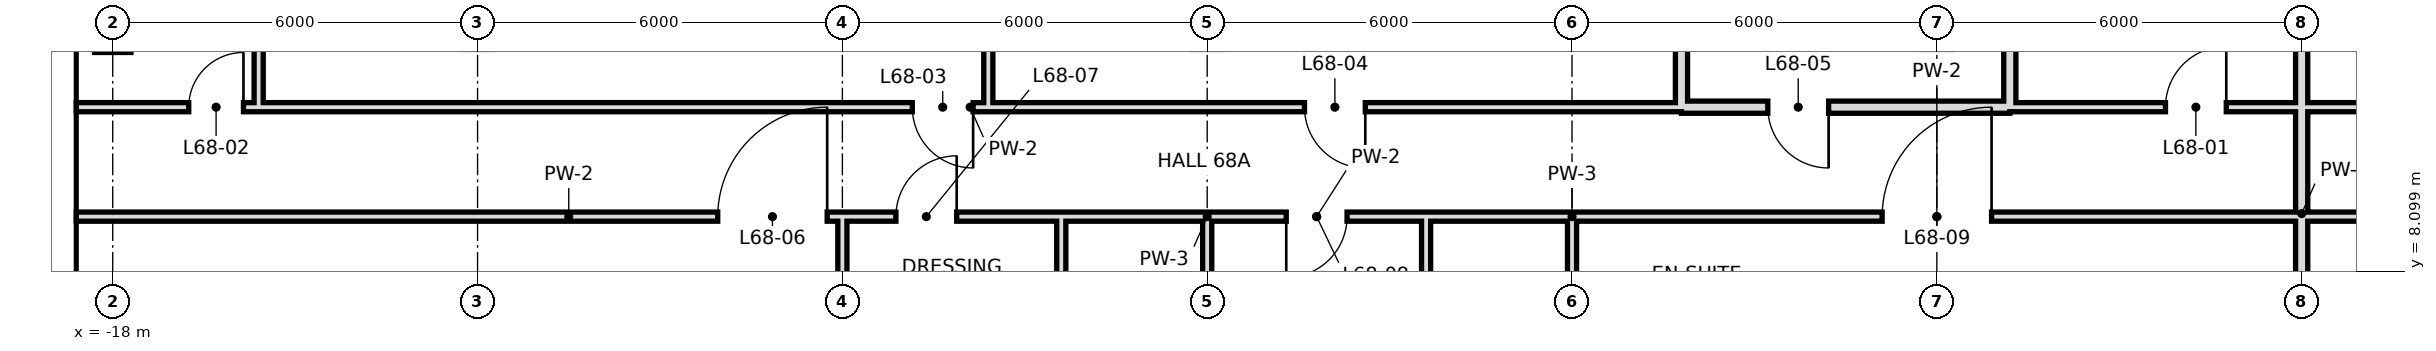
"""IFC4 building model, lengths in metres.
Left out: names, types, materials, properties, quantities, classifications, styles, units other than length and angle.
Written with IfcOpenShell. Run it as: python <this file> out.ifc"""

import sys

from ifc_helpers import new_model, si_unit, direction, frame, frame_2d, origin, place, context, subcontext, project, spatial, rectangle, extrude, element, fill, save


model = new_model("IFC4")
c1 = context("Model", 3, precision=1e-05, world=origin(), true_north=direction((0.0, 1.0)))
c2 = subcontext(c1, "Body", "Model", "MODEL_VIEW")
j1 = project(units=[si_unit("LENGTHUNIT", "METRE"), si_unit("PLANEANGLEUNIT", "RADIAN")], contexts=[c1])
p1 = place(None, origin())
s1 = spatial("IfcSite", under=j1, at=p1, CompositionType="ELEMENT")
p2 = place(p1, origin())
s2 = spatial("IfcBuilding", under=s1, at=p2, CompositionType="ELEMENT")
p3 = place(p2, frame((0.0, 0.0, 290.8)))
s3 = spatial("IfcBuildingStorey", under=s2, at=p3, CompositionType="ELEMENT", Elevation=290.8)
p4 = place(p3, frame((-15.6, 10.8, 0.0), z_axis=(0.0, 0.0, 1.0), x_axis=(0.0, 1.0, 0.0)))
e1 = element("IfcWall", 1, at=p4, inside=s3, PredefinedType="PARTITIONING", context=c2, shape_type="SweptSolid", body=[
    extrude(rectangle(XDim=7.2, YDim=0.15, at=frame_2d((3.6, 0.0))), origin(), (0.0, 0.0, 1.0), 3.42),
])
p5 = place(p3, frame((-2.4, 6.0, 0.0), z_axis=(0.0, 0.0, 1.0), x_axis=(0.0, 1.0, 0.0)))
e2 = element("IfcWall", 2, at=p5, inside=s3, PredefinedType="PARTITIONING", context=c2, shape_type="SweptSolid", body=[
    extrude(rectangle(XDim=3.0, YDim=0.15, at=frame_2d((1.5, 0.0))), origin(), (0.0, 0.0, 1.0), 3.42),
])
p6 = place(p3, frame((-3.6, 10.8, 0.0), z_axis=(0.0, 0.0, 1.0), x_axis=(0.0, 1.0, 0.0)))
e3 = element("IfcWall", 3, at=p6, inside=s3, PredefinedType="PARTITIONING", context=c2, shape_type="SweptSolid", body=[
    extrude(rectangle(XDim=7.2, YDim=0.15, at=frame_2d((3.6, 0.0))), origin(), (0.0, 0.0, 1.0), 3.42),
])
p7 = place(p3, frame((-6.0, -0.6, 0.0), z_axis=(0.0, 0.0, 1.0), x_axis=(0.0, 1.0, 0.0)))
e4 = element("IfcWall", 4, at=p7, inside=s3, PredefinedType="PARTITIONING", context=c2, shape_type="SweptSolid", body=[
    extrude(rectangle(XDim=9.6, YDim=0.15, at=frame_2d((4.8, 0.0))), origin(), (0.0, 0.0, 1.0), 3.42),
])
p8 = place(p3, frame((0.0, 6.0, 0.0), z_axis=(0.0, 0.0, 1.0), x_axis=(0.0, 1.0, 0.0)))
e5 = element("IfcWall", 5, at=p8, inside=s3, PredefinedType="PARTITIONING", context=c2, shape_type="SweptSolid", body=[
    extrude(rectangle(XDim=3.0, YDim=0.15, at=frame_2d((1.5, 0.0))), origin(), (0.0, 0.0, 1.0), 2.72),
])
p9 = place(p3, frame((13.2, 10.8, 0.0), z_axis=(0.0, 0.0, 1.0), x_axis=(0.0, 1.0, 0.0)))
e6 = element("IfcWall", 6, at=p9, inside=s3, PredefinedType="SOLIDWALL", context=c2, shape_type="SweptSolid", body=[
    extrude(rectangle(XDim=7.9, YDim=0.2, at=frame_2d((3.95, 0.0))), origin(), (0.0, 0.0, 1.0), 2.72),
])
p10 = place(p3, frame((18.0, -0.6, 0.0), z_axis=(0.0, 0.0, 1.0), x_axis=(0.0, 1.0, 0.0)))
e7 = element("IfcWall", 7, at=p10, inside=s3, PredefinedType="SOLIDWALL", context=c2, shape_type="SweptSolid", body=[
    extrude(rectangle(XDim=19.3, YDim=0.2, at=frame_2d((9.65, 0.0))), origin(), (0.0, 0.0, 1.0), 2.72),
])
p11 = place(p3, frame((3.6, 6.0, 0.0), z_axis=(0.0, 0.0, 1.0), x_axis=(0.0, 1.0, 0.0)))
e8 = element("IfcWall", 8, at=p11, inside=s3, PredefinedType="PARTITIONING", context=c2, shape_type="SweptSolid", body=[
    extrude(rectangle(XDim=3.0, YDim=0.15, at=frame_2d((1.5, 0.0))), origin(), (0.0, 0.0, 1.0), 3.42),
])
p12 = place(p3, frame((6.0, 6.0, 0.0), z_axis=(0.0, 0.0, 1.0), x_axis=(0.0, 1.0, 0.0)))
e9 = element("IfcWall", 9, at=p12, inside=s3, PredefinedType="PARTITIONING", context=c2, shape_type="SweptSolid", body=[
    extrude(rectangle(XDim=3.0, YDim=0.15, at=frame_2d((1.5, 0.0))), origin(), (0.0, 0.0, 1.0), 2.72),
])
p13 = place(p3, frame((7.8, 10.8, 0.0), z_axis=(0.0, 0.0, 1.0), x_axis=(0.0, 1.0, 0.0)))
e10 = element("IfcWall", 10, at=p13, inside=s3, PredefinedType="SOLIDWALL", context=c2, shape_type="SweptSolid", body=[
    extrude(rectangle(XDim=7.9, YDim=0.2, at=frame_2d((3.95, 0.0))), origin(), (0.0, 0.0, 1.0), 2.72),
])
p14 = place(p3, frame((7.8, 10.8, 0.0), z_axis=(0.0, 0.0, 1.0), x_axis=(1.0, 0.0, 0.0)))
e11 = element("IfcWall", 11, at=p14, inside=s3, PredefinedType="SOLIDWALL", context=c2, shape_type="SweptSolid", body=[
    extrude(rectangle(XDim=5.4, YDim=0.2, at=frame_2d((2.7, 0.0))), origin(), (0.0, 0.0, 1.0), 2.72),
])
p15 = place(p14, frame((1.42, 0.0, 0.0)))
e12 = element("IfcOpeningElement", 12, at=p15, cuts=e11, PredefinedType="OPENING", context=c2, shape_type="SweptSolid", body=[
    extrude(rectangle(XDim=1.0, YDim=2.4, at=frame_2d((0.5, 1.2))), frame((0.0, 0.11, 0.0), z_axis=(0.0, -1.0, 0.0), x_axis=(1.0, 0.0, 0.0)), (0.0, 0.0, 1.0), 0.22),
])
p16 = place(p3, frame((-15.6, 10.8, 0.0), z_axis=(0.0, 0.0, 1.0), x_axis=(1.0, 0.0, 0.0)))
e13 = element("IfcWall", 13, at=p16, inside=s3, PredefinedType="PARTITIONING", context=c2, shape_type="SweptSolid", body=[
    extrude(rectangle(XDim=23.4, YDim=0.15, at=frame_2d((11.7, 0.0))), origin(), (0.0, 0.0, 1.0), 3.42),
])
p17 = place(p16, frame((10.75, 0.0, 0.0)))
e14 = element("IfcOpeningElement", 14, at=p17, cuts=e13, PredefinedType="OPENING", context=c2, shape_type="SweptSolid", body=[
    extrude(rectangle(XDim=1.0, YDim=2.4, at=frame_2d((0.5, 1.2))), frame((0.0, 0.085, 0.0), z_axis=(0.0, -1.0, 0.0), x_axis=(1.0, 0.0, 0.0)), (0.0, 0.0, 1.0), 0.17),
])
p18 = place(p16, frame((17.2, 0.0, 0.0)))
e15 = element("IfcOpeningElement", 15, at=p18, cuts=e13, PredefinedType="OPENING", context=c2, shape_type="SweptSolid", body=[
    extrude(rectangle(XDim=1.0, YDim=2.4, at=frame_2d((0.5, 1.2))), frame((0.0, 0.085, 0.0), z_axis=(0.0, -1.0, 0.0), x_axis=(1.0, 0.0, 0.0)), (0.0, 0.0, 1.0), 0.17),
])
p19 = place(p3, frame((13.2, 10.8, 0.0), z_axis=(0.0, 0.0, 1.0), x_axis=(1.0, 0.0, 0.0)))
e16 = element("IfcWall", 16, at=p19, inside=s3, PredefinedType="PARTITIONING", context=c2, shape_type="SweptSolid", body=[
    extrude(rectangle(XDim=27.6, YDim=0.15, at=frame_2d((13.8, 0.0))), origin(), (0.0, 0.0, 1.0), 3.42),
])
p20 = place(p19, frame((2.56, 0.0, 0.0)))
e17 = element("IfcOpeningElement", 17, at=p20, cuts=e16, PredefinedType="OPENING", context=c2, shape_type="SweptSolid", body=[
    extrude(rectangle(XDim=1.0, YDim=2.4, at=frame_2d((0.5, 1.2))), frame((0.0, 0.085, 0.0), z_axis=(0.0, -1.0, 0.0), x_axis=(1.0, 0.0, 0.0)), (0.0, 0.0, 1.0), 0.17),
])
p21 = place(p19, frame((16.12, 0.0, 0.0)))
e18 = element("IfcOpeningElement", 18, at=p21, cuts=e16, PredefinedType="OPENING", context=c2, shape_type="SweptSolid", body=[
    extrude(rectangle(XDim=1.0, YDim=2.4, at=frame_2d((0.5, 1.2))), frame((0.0, 0.085, 0.0), z_axis=(0.0, -1.0, 0.0), x_axis=(1.0, 0.0, 0.0)), (0.0, 0.0, 1.0), 0.17),
])
p22 = place(p19, frame((9.1, 0.0, 0.0)))
e19 = element("IfcOpeningElement", 19, at=p22, cuts=e16, PredefinedType="OPENING", context=c2, shape_type="SweptSolid", body=[
    extrude(rectangle(XDim=1.0, YDim=2.4, at=frame_2d((0.5, 1.2))), frame((0.0, 0.085, 0.0), z_axis=(0.0, -1.0, 0.0), x_axis=(1.0, 0.0, 0.0)), (0.0, 0.0, 1.0), 0.17),
])
p23 = place(p19, frame((20.68, 0.0, 0.0)))
e20 = element("IfcOpeningElement", 20, at=p23, cuts=e16, PredefinedType="OPENING", context=c2, shape_type="SweptSolid", body=[
    extrude(rectangle(XDim=1.0, YDim=2.4, at=frame_2d((0.5, 1.2))), frame((0.0, 0.085, 0.0), z_axis=(0.0, -1.0, 0.0), x_axis=(1.0, 0.0, 0.0)), (0.0, 0.0, 1.0), 0.17),
])
p24 = place(p3, frame((-18.6, 10.8, 0.0), z_axis=(0.0, 0.0, 1.0), x_axis=(1.0, 0.0, 0.0)))
e21 = element("IfcWall", 21, at=p24, inside=s3, PredefinedType="PARTITIONING", context=c2, shape_type="SweptSolid", body=[
    extrude(rectangle(XDim=3.0, YDim=0.15, at=frame_2d((1.5, 0.0))), origin(), (0.0, 0.0, 1.0), 3.42),
])
p25 = place(p24, frame((1.85, 0.0, 0.0)))
e22 = element("IfcOpeningElement", 22, at=p25, cuts=e21, PredefinedType="OPENING", context=c2, shape_type="SweptSolid", body=[
    extrude(rectangle(XDim=0.9, YDim=2.4, at=frame_2d((0.45, 1.2))), frame((0.0, 0.085, 0.0), z_axis=(0.0, -1.0, 0.0), x_axis=(1.0, 0.0, 0.0)), (0.0, 0.0, 1.0), 0.17),
])
p26 = place(p3, frame((-18.6, 9.0, 0.0), z_axis=(0.0, 0.0, 1.0), x_axis=(1.0, 0.0, 0.0)))
e23 = element("IfcWall", 23, at=p26, inside=s3, PredefinedType="PARTITIONING", context=c2, shape_type="SweptSolid", body=[
    extrude(rectangle(XDim=16.2, YDim=0.15, at=frame_2d((8.1, 0.0))), origin(), (0.0, 0.0, 1.0), 3.42),
])
p27 = place(p26, frame((10.55, 0.0, 0.0)))
e24 = element("IfcOpeningElement", 24, at=p27, cuts=e23, PredefinedType="OPENING", context=c2, shape_type="SweptSolid", body=[
    extrude(rectangle(XDim=1.8, YDim=2.4, at=frame_2d((0.9, 1.2))), frame((0.0, 0.085, 0.0), z_axis=(0.0, -1.0, 0.0), x_axis=(1.0, 0.0, 0.0)), (0.0, 0.0, 1.0), 0.17),
])
p28 = place(p26, frame((13.48, 0.0, 0.0)))
e25 = element("IfcOpeningElement", 25, at=p28, cuts=e23, PredefinedType="OPENING", context=c2, shape_type="SweptSolid", body=[
    extrude(rectangle(XDim=1.0, YDim=2.4, at=frame_2d((0.5, 1.2))), frame((0.0, 0.085, 0.0), z_axis=(0.0, -1.0, 0.0), x_axis=(1.0, 0.0, 0.0)), (0.0, 0.0, 1.0), 0.17),
])
p29 = place(p3, frame((0.0, 9.0, 0.0), z_axis=(0.0, 0.0, 1.0), x_axis=(1.0, 0.0, 0.0)))
e26 = element("IfcWall", 26, at=p29, inside=s3, PredefinedType="PARTITIONING", context=c2, shape_type="SweptSolid", body=[
    extrude(rectangle(XDim=3.6, YDim=0.15, at=frame_2d((1.8, 0.0))), origin(), (0.0, 0.0, 1.0), 3.42),
])
p30 = place(p29, frame((1.3, 0.0, 0.0)))
e27 = element("IfcOpeningElement", 27, at=p30, cuts=e26, PredefinedType="OPENING", context=c2, shape_type="SweptSolid", body=[
    extrude(rectangle(XDim=1.0, YDim=2.4, at=frame_2d((0.5, 1.2))), frame((0.0, 0.085, 0.0), z_axis=(0.0, -1.0, 0.0), x_axis=(1.0, 0.0, 0.0)), (0.0, 0.0, 1.0), 0.17),
])
p31 = place(p3, frame((6.0, 9.0, 0.0), z_axis=(0.0, 0.0, 1.0), x_axis=(1.0, 0.0, 0.0)))
e28 = element("IfcWall", 28, at=p31, inside=s3, PredefinedType="PARTITIONING", context=c2, shape_type="SweptSolid", body=[
    extrude(rectangle(XDim=12.0, YDim=0.15, at=frame_2d((6.0, 0.0))), origin(), (0.0, 0.0, 1.0), 3.42),
])
p32 = place(p31, frame((5.1, 0.0, 0.0)))
e29 = element("IfcOpeningElement", 29, at=p32, cuts=e28, PredefinedType="OPENING", context=c2, shape_type="SweptSolid", body=[
    extrude(rectangle(XDim=1.8, YDim=2.4, at=frame_2d((0.9, 1.2))), frame((0.0, 0.085, 0.0), z_axis=(0.0, -1.0, 0.0), x_axis=(1.0, 0.0, 0.0)), (0.0, 0.0, 1.0), 0.17),
])
for number, where, z_axis, x_axis in (
    (30, (-2.4, 9.0, 0.0), (0.0, 0.0, 1.0), (1.0, 0.0, 0.0)),
    (31, (3.6, 9.0, 0.0), (0.0, 0.0, 1.0), (1.0, 0.0, 0.0)),
    (32, (18.0, 9.0, 0.0), (0.0, 0.0, 1.0), (1.0, 0.0, 0.0)),
):
    element("IfcWall", number, at=place(p3, frame(where, z_axis=z_axis, x_axis=x_axis)), inside=s3, PredefinedType="PARTITIONING", context=c2, shape_type="SweptSolid", body=[
        extrude(rectangle(XDim=2.4, YDim=0.15, at=frame_2d((1.2, 0.0))), origin(), (0.0, 0.0, 1.0), 3.42),
    ])
p33 = place(p20, frame((1.0, 0.0, 0.0), z_axis=(0.0, 0.0, 1.0), x_axis=(-1.0, 0.0, 0.0)))
e33 = element("IfcDoor", 33, at=p33, inside=s3, OperationType="SINGLE_SWING_LEFT", PredefinedType="DOOR", context=c2, shape_type="SweptSolid", body=[
    extrude(rectangle(XDim=1.0, YDim=2.4, at=frame_2d((0.5, 1.2))), frame((0.0, 0.025, 0.0), z_axis=(0.0, -1.0, 0.0), x_axis=(1.0, 0.0, 0.0)), (0.0, 0.0, 1.0), 0.05),
])
fill(e17, e33)
p34 = place(p25, frame((0.9, 0.0, 0.0), z_axis=(0.0, 0.0, 1.0), x_axis=(-1.0, 0.0, 0.0)))
e34 = element("IfcDoor", 34, at=p34, inside=s3, OperationType="SINGLE_SWING_LEFT", PredefinedType="DOOR", context=c2, shape_type="SweptSolid", body=[
    extrude(rectangle(XDim=0.9, YDim=2.4, at=frame_2d((0.45, 1.2))), frame((0.0, 0.025, 0.0), z_axis=(0.0, -1.0, 0.0), x_axis=(1.0, 0.0, 0.0)), (0.0, 0.0, 1.0), 0.05),
])
fill(e22, e34)
p35 = place(p17, origin())
e35 = element("IfcDoor", 35, at=p35, inside=s3, OperationType="SINGLE_SWING_RIGHT", PredefinedType="DOOR", context=c2, shape_type="SweptSolid", body=[
    extrude(rectangle(XDim=1.0, YDim=2.4, at=frame_2d((0.5, 1.2))), frame((0.0, 0.025, 0.0), z_axis=(0.0, -1.0, 0.0), x_axis=(1.0, 0.0, 0.0)), (0.0, 0.0, 1.0), 0.05),
])
fill(e14, e35)
p36 = place(p18, origin())
e36 = element("IfcDoor", 36, at=p36, inside=s3, OperationType="SINGLE_SWING_RIGHT", PredefinedType="DOOR", context=c2, shape_type="SweptSolid", body=[
    extrude(rectangle(XDim=1.0, YDim=2.4, at=frame_2d((0.5, 1.2))), frame((0.0, 0.025, 0.0), z_axis=(0.0, -1.0, 0.0), x_axis=(1.0, 0.0, 0.0)), (0.0, 0.0, 1.0), 0.05),
])
fill(e15, e36)
p37 = place(p15, origin())
e37 = element("IfcDoor", 37, at=p37, inside=s3, OperationType="SINGLE_SWING_RIGHT", PredefinedType="DOOR", context=c2, shape_type="SweptSolid", body=[
    extrude(rectangle(XDim=1.0, YDim=2.4, at=frame_2d((0.5, 1.2))), frame((0.0, 0.025, 0.0), z_axis=(0.0, -1.0, 0.0), x_axis=(1.0, 0.0, 0.0)), (0.0, 0.0, 1.0), 0.05),
])
fill(e12, e37)
p38 = place(p27, frame((1.8, 0.0, 0.0), z_axis=(0.0, 0.0, 1.0), x_axis=(-1.0, 0.0, 0.0)))
e38 = element("IfcDoor", 38, at=p38, inside=s3, OperationType="SINGLE_SWING_LEFT", PredefinedType="DOOR", context=c2, shape_type="SweptSolid", body=[
    extrude(rectangle(XDim=1.8, YDim=2.4, at=frame_2d((0.9, 1.2))), frame((0.0, 0.025, 0.0), z_axis=(0.0, -1.0, 0.0), x_axis=(1.0, 0.0, 0.0)), (0.0, 0.0, 1.0), 0.05),
])
fill(e24, e38)
p39 = place(p28, frame((1.0, 0.0, 0.0), z_axis=(0.0, 0.0, 1.0), x_axis=(-1.0, 0.0, 0.0)))
e39 = element("IfcDoor", 39, at=p39, inside=s3, OperationType="SINGLE_SWING_LEFT", PredefinedType="DOOR", context=c2, shape_type="SweptSolid", body=[
    extrude(rectangle(XDim=1.0, YDim=2.4, at=frame_2d((0.5, 1.2))), frame((0.0, 0.025, 0.0), z_axis=(0.0, -1.0, 0.0), x_axis=(1.0, 0.0, 0.0)), (0.0, 0.0, 1.0), 0.05),
])
fill(e25, e39)
p40 = place(p30, frame((1.0, 0.0, 0.0), z_axis=(0.0, 0.0, 1.0), x_axis=(-1.0, 0.0, 0.0)))
e40 = element("IfcDoor", 40, at=p40, inside=s3, OperationType="SINGLE_SWING_RIGHT", PredefinedType="DOOR", context=c2, shape_type="SweptSolid", body=[
    extrude(rectangle(XDim=1.0, YDim=2.4, at=frame_2d((0.5, 1.2))), frame((0.0, 0.025, 0.0), z_axis=(0.0, -1.0, 0.0), x_axis=(1.0, 0.0, 0.0)), (0.0, 0.0, 1.0), 0.05),
])
fill(e27, e40)
p41 = place(p32, frame((1.8, 0.0, 0.0), z_axis=(0.0, 0.0, 1.0), x_axis=(-1.0, 0.0, 0.0)))
e41 = element("IfcDoor", 41, at=p41, inside=s3, OperationType="SINGLE_SWING_LEFT", PredefinedType="DOOR", context=c2, shape_type="SweptSolid", body=[
    extrude(rectangle(XDim=1.8, YDim=2.4, at=frame_2d((0.9, 1.2))), frame((0.0, 0.025, 0.0), z_axis=(0.0, -1.0, 0.0), x_axis=(1.0, 0.0, 0.0)), (0.0, 0.0, 1.0), 0.05),
])
fill(e29, e41)
save(model, sys.argv[1])
